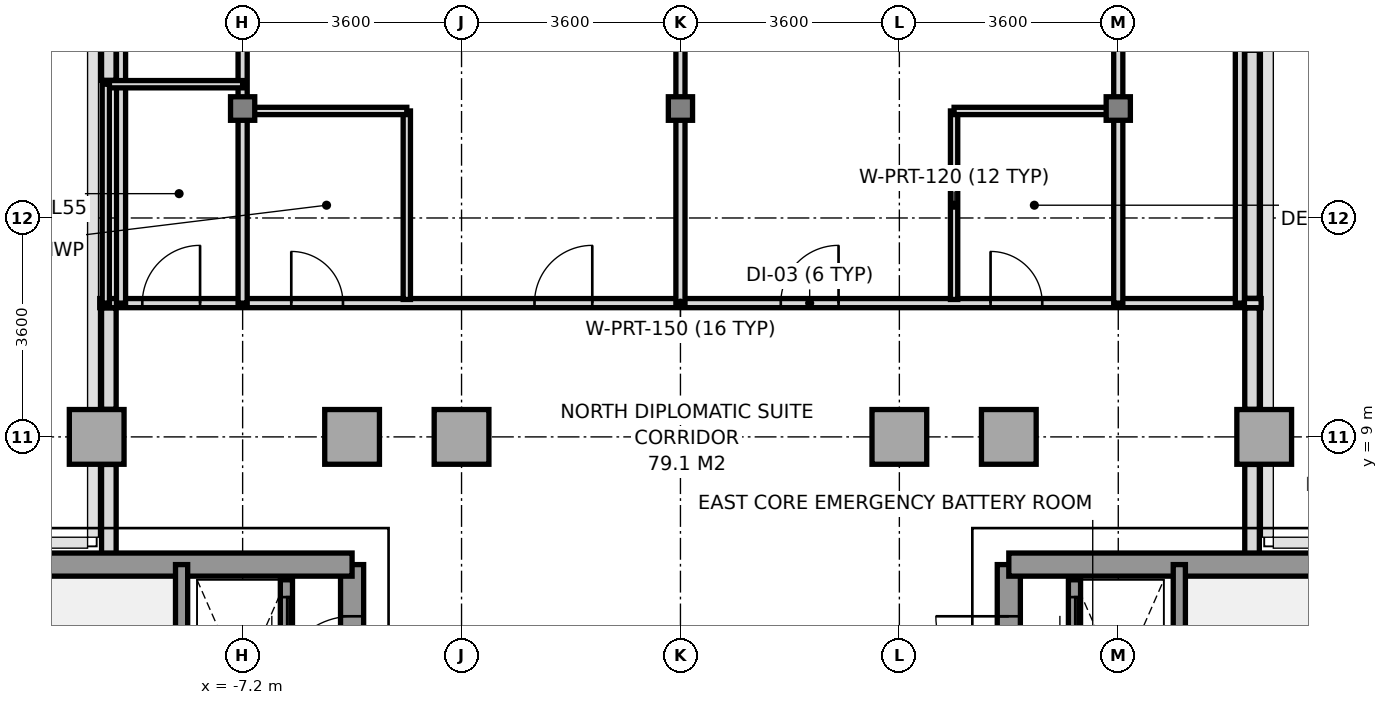
"""IFC4 building model, lengths in metres.
Left out: names, types, materials, properties, quantities, classifications, styles, units other than length and angle.
Written with IfcOpenShell. Run it as: python <this file> out.ifc"""

import sys

from ifc_helpers import new_model, si_unit, direction, frame, frame_2d, origin, origin_2d, place, context, subcontext, project, spatial, rectangle, i_section, extrude, source, transform, mapped, element, fill, save


model = new_model("IFC4")
c1 = context("Model", 3, precision=1e-05, world=origin(), true_north=direction((0.0, 1.0)))
c2 = subcontext(c1, "Body", "Model", "MODEL_VIEW")
j1 = project(units=[si_unit("LENGTHUNIT", "METRE"), si_unit("PLANEANGLEUNIT", "RADIAN")], contexts=[c1])
p1 = place(None, origin())
s1 = spatial("IfcSite", under=j1, at=p1, CompositionType="ELEMENT")
p2 = place(p1, origin())
s2 = spatial("IfcBuilding", under=s1, at=p2, CompositionType="ELEMENT")
p3 = place(p2, frame((0.0, 0.0, 201.2)))
s3 = spatial("IfcBuildingStorey", under=s2, at=p3, CompositionType="ELEMENT", Elevation=201.2)
m1 = source(origin(), c2, "Body", "SweptSolid", [
    extrude(rectangle(XDim=0.9, YDim=0.9, at=origin_2d()), origin(), (0.0, 0.0, 1.0), 3.2),
])
p4 = place(p3, frame((-9.6, 9.0, 0.0), z_axis=(0.0, 0.0, 1.0), x_axis=(1.0, 0.0, 0.0)))
e1 = element("IfcColumn", 1, at=p4, inside=s3, PredefinedType="COLUMN", context=c2, shape_type="MappedRepresentation", body=[
    mapped(m1, transform((0.0, 0.0, 0.0), x_axis=(1.0, 0.0, 0.0), y_axis=(0.0, 1.0, 0.0), z_axis=(0.0, 0.0, 1.0), scale=1.0)),
])
m2 = source(origin(), c2, "Body", "SweptSolid", [
    extrude(i_section(OverallWidth=0.398, OverallDepth=0.387, WebThickness=0.018, FlangeThickness=0.028, at=origin_2d()), origin(), (0.0, 0.0, 1.0), 3.2),
])
p5 = place(p3, frame((-7.2, 14.4, 0.0), z_axis=(0.0, 0.0, 1.0), x_axis=(1.0, 0.0, 0.0)))
e2 = element("IfcColumn", 2, at=p5, inside=s3, PredefinedType="COLUMN", context=c2, shape_type="MappedRepresentation", body=[
    mapped(m2, transform((0.0, 0.0, 0.0), x_axis=(1.0, 0.0, 0.0), y_axis=(0.0, 1.0, 0.0), z_axis=(0.0, 0.0, 1.0), scale=1.0)),
])
for number, where, z_axis, x_axis in (
    (3, (-5.4, 9.0, 0.0), (0.0, 0.0, 1.0), (1.0, 0.0, 0.0)),
    (4, (-3.6, 9.0, 0.0), (0.0, 0.0, 1.0), (1.0, 0.0, 0.0)),
):
    element("IfcColumn", number, at=place(p3, frame(where, z_axis=z_axis, x_axis=x_axis)), inside=s3, PredefinedType="COLUMN", context=c2, shape_type="MappedRepresentation", body=[
        mapped(m1, transform((0.0, 0.0, 0.0), x_axis=(1.0, 0.0, 0.0), y_axis=(0.0, 1.0, 0.0), z_axis=(0.0, 0.0, 1.0), scale=1.0)),
    ])
p6 = place(p3, frame((0.0, 14.4, 0.0), z_axis=(0.0, 0.0, 1.0), x_axis=(1.0, 0.0, 0.0)))
e5 = element("IfcColumn", 5, at=p6, inside=s3, PredefinedType="COLUMN", context=c2, shape_type="MappedRepresentation", body=[
    mapped(m2, transform((0.0, 0.0, 0.0), x_axis=(1.0, 0.0, 0.0), y_axis=(0.0, 1.0, 0.0), z_axis=(0.0, 0.0, 1.0), scale=1.0)),
])
for number, where, z_axis, x_axis in (
    (6, (3.6, 9.0, 0.0), (0.0, 0.0, 1.0), (1.0, 0.0, 0.0)),
    (7, (5.4, 9.0, 0.0), (0.0, 0.0, 1.0), (1.0, 0.0, 0.0)),
):
    element("IfcColumn", number, at=place(p3, frame(where, z_axis=z_axis, x_axis=x_axis)), inside=s3, PredefinedType="COLUMN", context=c2, shape_type="MappedRepresentation", body=[
        mapped(m1, transform((0.0, 0.0, 0.0), x_axis=(1.0, 0.0, 0.0), y_axis=(0.0, 1.0, 0.0), z_axis=(0.0, 0.0, 1.0), scale=1.0)),
    ])
p7 = place(p3, frame((7.2, 14.4, 0.0), z_axis=(0.0, 0.0, 1.0), x_axis=(1.0, 0.0, 0.0)))
e8 = element("IfcColumn", 8, at=p7, inside=s3, PredefinedType="COLUMN", context=c2, shape_type="MappedRepresentation", body=[
    mapped(m2, transform((0.0, 0.0, 0.0), x_axis=(1.0, 0.0, 0.0), y_axis=(0.0, 1.0, 0.0), z_axis=(0.0, 0.0, 1.0), scale=1.0)),
])
p8 = place(p3, frame((9.6, 9.0, 0.0), z_axis=(0.0, 0.0, 1.0), x_axis=(1.0, 0.0, 0.0)))
e9 = element("IfcColumn", 9, at=p8, inside=s3, PredefinedType="COLUMN", context=c2, shape_type="MappedRepresentation", body=[
    mapped(m1, transform((0.0, 0.0, 0.0), x_axis=(1.0, 0.0, 0.0), y_axis=(0.0, 1.0, 0.0), z_axis=(0.0, 0.0, 1.0), scale=1.0)),
])
p9 = place(p3, frame((-9.4, 6.953, 0.0), z_axis=(0.0, 0.0, 1.0), x_axis=(0.0, 1.0, 0.0)))
e10 = element("IfcWall", 10, at=p9, inside=s3, PredefinedType="PARAPET", context=c2, shape_type="SweptSolid", body=[
    extrude(rectangle(XDim=1.594, YDim=0.24, at=frame_2d((0.797, 0.0))), origin(), (0.0, 0.0, 1.0), 1.15),
])
p10 = place(p3, frame((-9.4, 9.453, 0.0), z_axis=(0.0, 0.0, 1.0), x_axis=(0.0, 1.0, 0.0)))
e11 = element("IfcWall", 11, at=p10, inside=s3, PredefinedType="PARAPET", context=c2, shape_type="SweptSolid", body=[
    extrude(rectangle(XDim=1.669, YDim=0.24, at=frame_2d((0.834, 0.0))), origin(), (0.0, 0.0, 1.0), 1.15),
])
p11 = place(p3, frame((-9.4, 14.863, 0.0), z_axis=(0.0, 0.0, 1.0), x_axis=(0.0, 1.0, 0.0)))
e12 = element("IfcWall", 12, at=p11, inside=s3, PredefinedType="PARAPET", context=c2, shape_type="SweptSolid", body=[
    extrude(rectangle(XDim=0.74, YDim=0.24, at=frame_2d((0.37, 0.0))), origin(), (0.0, 0.0, 1.0), 1.15),
])
p12 = place(p3, frame((9.4, 15.358, 0.0), z_axis=(0.0, 0.0, 1.0), x_axis=(0.0, -1.0, 0.0)))
e13 = element("IfcWall", 13, at=p12, inside=s3, PredefinedType="PARAPET", context=c2, shape_type="SweptSolid", body=[
    extrude(rectangle(XDim=4.08, YDim=0.24, at=frame_2d((2.04, 0.0))), origin(), (0.0, 0.0, 1.0), 1.15),
])
p13 = place(p3, frame((9.4, 11.122, 0.0), z_axis=(0.0, 0.0, 1.0), x_axis=(0.0, -1.0, 0.0)))
e14 = element("IfcWall", 14, at=p13, inside=s3, PredefinedType="PARAPET", context=c2, shape_type="SweptSolid", body=[
    extrude(rectangle(XDim=1.669, YDim=0.24, at=frame_2d((0.834, 0.0))), origin(), (0.0, 0.0, 1.0), 1.15),
])
p14 = place(p3, frame((9.4, 8.547, 0.0), z_axis=(0.0, 0.0, 1.0), x_axis=(0.0, -1.0, 0.0)))
e15 = element("IfcWall", 15, at=p14, inside=s3, PredefinedType="PARAPET", context=c2, shape_type="SweptSolid", body=[
    extrude(rectangle(XDim=1.594, YDim=0.24, at=frame_2d((0.797, 0.0))), origin(), (0.0, 0.0, 1.0), 1.15),
])
p15 = place(p3, frame((-5.4, -5.6, 0.0), z_axis=(0.0, 0.0, 1.0), x_axis=(0.0, 1.0, 0.0)))
e16 = element("IfcWall", 16, at=p15, inside=s3, PredefinedType="SHEAR", context=c2, shape_type="SweptSolid", body=[
    extrude(rectangle(XDim=12.5, YDim=0.38, at=frame_2d((6.25, 0.0))), origin(), (0.0, 0.0, 1.0), 3.2),
])
p16 = place(p15, frame((4.55, 0.0, 0.0)))
e17 = element("IfcOpeningElement", 17, at=p16, cuts=e16, PredefinedType="OPENING", context=c2, shape_type="SweptSolid", body=[
    extrude(rectangle(XDim=1.2, YDim=2.2, at=frame_2d((0.6, 1.1))), frame((0.0, 0.2, 0.0), z_axis=(0.0, -1.0, 0.0), x_axis=(1.0, 0.0, 0.0)), (0.0, 0.0, 1.0), 0.4),
])
p17 = place(p15, frame((10.45, 0.0, 0.0)))
e18 = element("IfcOpeningElement", 18, at=p17, cuts=e16, PredefinedType="OPENING", context=c2, shape_type="SweptSolid", body=[
    extrude(rectangle(XDim=1.2, YDim=2.2, at=frame_2d((0.6, 1.1))), frame((0.0, 0.2, 0.0), z_axis=(0.0, -1.0, 0.0), x_axis=(1.0, 0.0, 0.0)), (0.0, 0.0, 1.0), 0.4),
])
p18 = place(p3, frame((-11.356, 6.9, 0.0), z_axis=(0.0, 0.0, 1.0), x_axis=(1.0, 0.0, 0.0)))
e19 = element("IfcWall", 19, at=p18, inside=s3, PredefinedType="SHEAR", context=c2, shape_type="SweptSolid", body=[
    extrude(rectangle(XDim=5.956, YDim=0.38, at=frame_2d((2.978, 0.0))), origin(), (0.0, 0.0, 1.0), 3.2),
])
p19 = place(p3, frame((-8.204, -0.016, 0.0), z_axis=(0.0, 0.0, 1.0), x_axis=(0.0, 1.0, 0.0)))
e20 = element("IfcWall", 20, at=p19, inside=s3, PredefinedType="SOLIDWALL", context=c2, shape_type="SweptSolid", body=[
    extrude(rectangle(XDim=6.916, YDim=0.2, at=frame_2d((3.458, 0.0))), origin(), (0.0, 0.0, 1.0), 3.2),
])
p20 = place(p19, frame((0.2, 0.0, 0.0)))
e21 = element("IfcOpeningElement", 21, at=p20, cuts=e20, PredefinedType="OPENING", context=c2, shape_type="SweptSolid", body=[
    extrude(rectangle(XDim=1.2, YDim=2.2, at=frame_2d((0.6, 1.1))), frame((0.0, 0.11, 0.0), z_axis=(0.0, -1.0, 0.0), x_axis=(1.0, 0.0, 0.0)), (0.0, 0.0, 1.0), 0.22),
])
p21 = place(p3, frame((5.4, -5.6, 0.0), z_axis=(0.0, 0.0, 1.0), x_axis=(0.0, 1.0, 0.0)))
e22 = element("IfcWall", 22, at=p21, inside=s3, PredefinedType="SHEAR", context=c2, shape_type="SweptSolid", body=[
    extrude(rectangle(XDim=12.5, YDim=0.38, at=frame_2d((6.25, 0.0))), origin(), (0.0, 0.0, 1.0), 3.2),
])
p22 = place(p21, frame((4.55, 0.0, 0.0)))
e23 = element("IfcOpeningElement", 23, at=p22, cuts=e22, PredefinedType="OPENING", context=c2, shape_type="SweptSolid", body=[
    extrude(rectangle(XDim=1.2, YDim=2.2, at=frame_2d((0.6, 1.1))), frame((0.0, 0.2, 0.0), z_axis=(0.0, -1.0, 0.0), x_axis=(1.0, 0.0, 0.0)), (0.0, 0.0, 1.0), 0.4),
])
p23 = place(p21, frame((10.45, 0.0, 0.0)))
e24 = element("IfcOpeningElement", 24, at=p23, cuts=e22, PredefinedType="OPENING", context=c2, shape_type="SweptSolid", body=[
    extrude(rectangle(XDim=1.2, YDim=2.2, at=frame_2d((0.6, 1.1))), frame((0.0, 0.2, 0.0), z_axis=(0.0, -1.0, 0.0), x_axis=(1.0, 0.0, 0.0)), (0.0, 0.0, 1.0), 0.4),
])
p24 = place(p21, frame((7.88, 0.0, 0.0)))
e25 = element("IfcOpeningElement", 25, at=p24, cuts=e22, PredefinedType="OPENING", context=c2, shape_type="SweptSolid", body=[
    extrude(rectangle(XDim=0.8, YDim=2.1, at=frame_2d((0.4, 1.05))), frame((0.0, 0.2, 0.0), z_axis=(0.0, -1.0, 0.0), x_axis=(1.0, 0.0, 0.0)), (0.0, 0.0, 1.0), 0.4),
])
p25 = place(p3, frame((5.4, 6.9, 0.0), z_axis=(0.0, 0.0, 1.0), x_axis=(1.0, 0.0, 0.0)))
e26 = element("IfcWall", 26, at=p25, inside=s3, PredefinedType="SHEAR", context=c2, shape_type="SweptSolid", body=[
    extrude(rectangle(XDim=5.956, YDim=0.38, at=frame_2d((2.978, 0.0))), origin(), (0.0, 0.0, 1.0), 3.2),
])
p26 = place(p3, frame((8.204, -0.016, 0.0), z_axis=(0.0, 0.0, 1.0), x_axis=(0.0, 1.0, 0.0)))
e27 = element("IfcWall", 27, at=p26, inside=s3, PredefinedType="SOLIDWALL", context=c2, shape_type="SweptSolid", body=[
    extrude(rectangle(XDim=6.916, YDim=0.2, at=frame_2d((3.458, 0.0))), origin(), (0.0, 0.0, 1.0), 3.2),
])
p27 = place(p26, frame((0.2, 0.0, 0.0)))
e28 = element("IfcOpeningElement", 28, at=p27, cuts=e27, PredefinedType="OPENING", context=c2, shape_type="SweptSolid", body=[
    extrude(rectangle(XDim=1.2, YDim=2.2, at=frame_2d((0.6, 1.1))), frame((0.0, 0.11, 0.0), z_axis=(0.0, -1.0, 0.0), x_axis=(1.0, 0.0, 0.0)), (0.0, 0.0, 1.0), 0.22),
])
p28 = place(p3, frame((-6.48, 4.98, 0.0), z_axis=(0.0, 0.0, 1.0), x_axis=(0.0, 1.0, 0.0)))
e29 = element("IfcWall", 29, at=p28, inside=s3, PredefinedType="SOLIDWALL", context=c2, shape_type="SweptSolid", body=[
    extrude(rectangle(XDim=1.67, YDim=0.2, at=frame_2d((0.835, 0.0))), origin(), (0.0, 0.0, 1.0), 3.2),
])
p29 = place(p28, frame((0.285, 0.0, 0.0)))
e30 = element("IfcOpeningElement", 30, at=p29, cuts=e29, PredefinedType="OPENING", context=c2, shape_type="SweptSolid", body=[
    extrude(rectangle(XDim=1.1, YDim=2.2, at=frame_2d((0.55, 1.1))), frame((0.0, 0.11, 0.0), z_axis=(0.0, -1.0, 0.0), x_axis=(1.0, 0.0, 0.0)), (0.0, 0.0, 1.0), 0.22),
])
p30 = place(p3, frame((6.48, 4.98, 0.0), z_axis=(0.0, 0.0, 1.0), x_axis=(0.0, 1.0, 0.0)))
e31 = element("IfcWall", 31, at=p30, inside=s3, PredefinedType="SOLIDWALL", context=c2, shape_type="SweptSolid", body=[
    extrude(rectangle(XDim=1.67, YDim=0.2, at=frame_2d((0.835, 0.0))), origin(), (0.0, 0.0, 1.0), 3.2),
])
p31 = place(p30, frame((0.285, 0.0, 0.0)))
e32 = element("IfcOpeningElement", 32, at=p31, cuts=e31, PredefinedType="OPENING", context=c2, shape_type="SweptSolid", body=[
    extrude(rectangle(XDim=1.1, YDim=2.2, at=frame_2d((0.55, 1.1))), frame((0.0, 0.11, 0.0), z_axis=(0.0, -1.0, 0.0), x_axis=(1.0, 0.0, 0.0)), (0.0, 0.0, 1.0), 0.22),
])
p32 = place(p3, frame((-9.55, 11.2, 0.0), z_axis=(0.0, 0.0, 1.0), x_axis=(1.0, 0.0, 0.0)))
e33 = element("IfcWall", 33, at=p32, inside=s3, PredefinedType="PARTITIONING", context=c2, shape_type="SweptSolid", body=[
    extrude(rectangle(XDim=19.1, YDim=0.15, at=frame_2d((9.55, 0.0))), origin(), (0.0, 0.0, 1.0), 3.2),
])
p33 = place(p32, frame((0.7, 0.0, 0.0)))
e34 = element("IfcOpeningElement", 34, at=p33, cuts=e33, PredefinedType="OPENING", context=c2, shape_type="SweptSolid", body=[
    extrude(rectangle(XDim=0.95, YDim=2.15, at=frame_2d((0.475, 1.075))), frame((0.0, 0.085, 0.0), z_axis=(0.0, -1.0, 0.0), x_axis=(1.0, 0.0, 0.0)), (0.0, 0.0, 1.0), 0.17),
])
p34 = place(p32, frame((3.15, 0.0, 0.0)))
e35 = element("IfcOpeningElement", 35, at=p34, cuts=e33, PredefinedType="OPENING", context=c2, shape_type="SweptSolid", body=[
    extrude(rectangle(XDim=0.85, YDim=2.1, at=frame_2d((0.425, 1.05))), frame((0.0, 0.085, 0.0), z_axis=(0.0, -1.0, 0.0), x_axis=(1.0, 0.0, 0.0)), (0.0, 0.0, 1.0), 0.17),
])
p35 = place(p32, frame((7.15, 0.0, 0.0)))
e36 = element("IfcOpeningElement", 36, at=p35, cuts=e33, PredefinedType="OPENING", context=c2, shape_type="SweptSolid", body=[
    extrude(rectangle(XDim=0.95, YDim=2.15, at=frame_2d((0.475, 1.075))), frame((0.0, 0.085, 0.0), z_axis=(0.0, -1.0, 0.0), x_axis=(1.0, 0.0, 0.0)), (0.0, 0.0, 1.0), 0.17),
])
p36 = place(p32, frame((14.65, 0.0, 0.0)))
e37 = element("IfcOpeningElement", 37, at=p36, cuts=e33, PredefinedType="OPENING", context=c2, shape_type="SweptSolid", body=[
    extrude(rectangle(XDim=0.85, YDim=2.1, at=frame_2d((0.425, 1.05))), frame((0.0, 0.085, 0.0), z_axis=(0.0, -1.0, 0.0), x_axis=(1.0, 0.0, 0.0)), (0.0, 0.0, 1.0), 0.17),
])
p37 = place(p32, frame((11.2, 0.0, 0.0)))
e38 = element("IfcOpeningElement", 38, at=p37, cuts=e33, PredefinedType="OPENING", context=c2, shape_type="SweptSolid", body=[
    extrude(rectangle(XDim=0.95, YDim=2.15, at=frame_2d((0.475, 1.075))), frame((0.0, 0.085, 0.0), z_axis=(0.0, -1.0, 0.0), x_axis=(1.0, 0.0, 0.0)), (0.0, 0.0, 1.0), 0.17),
])
for number, where, z_axis, x_axis in (
    (39, (-9.2, 11.2, 0.0), (0.0, 0.0, 1.0), (0.0, 1.0, 0.0)),
    (40, (9.2, 11.2, 0.0), (0.0, 0.0, 1.0), (0.0, 1.0, 0.0)),
):
    element("IfcWall", number, at=place(p3, frame(where, z_axis=z_axis, x_axis=x_axis)), inside=s3, PredefinedType="PARTITIONING", context=c2, shape_type="SweptSolid", body=[
        extrude(rectangle(XDim=4.48, YDim=0.15, at=frame_2d((2.24, 0.0))), origin(), (0.0, 0.0, 1.0), 3.2),
    ])
p38 = place(p3, frame((-7.2, 11.2, 0.0), z_axis=(0.0, 0.0, 1.0), x_axis=(0.0, 1.0, 0.0)))
e41 = element("IfcWall", 41, at=p38, inside=s3, PredefinedType="PARTITIONING", context=c2, shape_type="SweptSolid", body=[
    extrude(rectangle(XDim=12.2, YDim=0.15, at=frame_2d((6.1, 0.0))), origin(), (0.0, 0.0, 1.0), 2.75),
])
p39 = place(p3, frame((0.0, 11.2, 0.0), z_axis=(0.0, 0.0, 1.0), x_axis=(0.0, 1.0, 0.0)))
e42 = element("IfcWall", 42, at=p39, inside=s3, PredefinedType="PARTITIONING", context=c2, shape_type="SweptSolid", body=[
    extrude(rectangle(XDim=13.45, YDim=0.15, at=frame_2d((6.725, 0.0))), origin(), (0.0, 0.0, 1.0), 2.75),
])
p40 = place(p3, frame((7.2, 11.2, 0.0), z_axis=(0.0, 0.0, 1.0), x_axis=(0.0, 1.0, 0.0)))
e43 = element("IfcWall", 43, at=p40, inside=s3, PredefinedType="PARTITIONING", context=c2, shape_type="SweptSolid", body=[
    extrude(rectangle(XDim=12.2, YDim=0.15, at=frame_2d((6.1, 0.0))), origin(), (0.0, 0.0, 1.0), 2.75),
])
p41 = place(p3, frame((-9.45, 14.8, 0.0), z_axis=(0.0, 0.0, 1.0), x_axis=(1.0, 0.0, 0.0)))
e44 = element("IfcWall", 44, at=p41, inside=s3, PredefinedType="PARTITIONING", context=c2, shape_type="SweptSolid", body=[
    extrude(rectangle(XDim=2.25, YDim=0.12, at=frame_2d((1.125, 0.0))), origin(), (0.0, 0.0, 1.0), 3.2),
])
p42 = place(p3, frame((-9.45, 11.2, 0.0), z_axis=(0.0, 0.0, 1.0), x_axis=(0.0, 1.0, 0.0)))
e45 = element("IfcWall", 45, at=p42, inside=s3, PredefinedType="PARTITIONING", context=c2, shape_type="SweptSolid", body=[
    extrude(rectangle(XDim=3.6, YDim=0.12, at=frame_2d((1.8, 0.0))), origin(), (0.0, 0.0, 1.0), 3.2),
])
p43 = place(p3, frame((-4.5, 11.26, 0.0), z_axis=(0.0, 0.0, 1.0), x_axis=(0.0, 1.0, 0.0)))
e46 = element("IfcWall", 46, at=p43, inside=s3, PredefinedType="PARTITIONING", context=c2, shape_type="SweptSolid", body=[
    extrude(rectangle(XDim=3.1, YDim=0.12, at=frame_2d((1.55, 0.0))), origin(), (0.0, 0.0, 1.0), 2.75),
])
p44 = place(p3, frame((-7.14, 14.36, 0.0), z_axis=(0.0, 0.0, 1.0), x_axis=(1.0, 0.0, 0.0)))
e47 = element("IfcWall", 47, at=p44, inside=s3, PredefinedType="PARTITIONING", context=c2, shape_type="SweptSolid", body=[
    extrude(rectangle(XDim=2.64, YDim=0.12, at=frame_2d((1.32, 0.0))), origin(), (0.0, 0.0, 1.0), 2.75),
])
p45 = place(p3, frame((4.5, 11.26, 0.0), z_axis=(0.0, 0.0, 1.0), x_axis=(0.0, 1.0, 0.0)))
e48 = element("IfcWall", 48, at=p45, inside=s3, PredefinedType="PARTITIONING", context=c2, shape_type="SweptSolid", body=[
    extrude(rectangle(XDim=3.1, YDim=0.12, at=frame_2d((1.55, 0.0))), origin(), (0.0, 0.0, 1.0), 2.75),
])
p46 = place(p3, frame((4.5, 14.36, 0.0), z_axis=(0.0, 0.0, 1.0), x_axis=(1.0, 0.0, 0.0)))
e49 = element("IfcWall", 49, at=p46, inside=s3, PredefinedType="PARTITIONING", context=c2, shape_type="SweptSolid", body=[
    extrude(rectangle(XDim=2.64, YDim=0.12, at=frame_2d((1.32, 0.0))), origin(), (0.0, 0.0, 1.0), 2.75),
])
m3 = source(origin(), c2, "Body", "SweptSolid", [
    extrude(rectangle(XDim=1.2, YDim=2.2, at=frame_2d((0.6, 1.1))), frame((0.0, 0.025, 0.0), z_axis=(0.0, -1.0, 0.0), x_axis=(1.0, 0.0, 0.0)), (0.0, 0.0, 1.0), 0.05),
])
p47 = place(p17, origin())
e50 = element("IfcDoor", 50, at=p47, inside=s3, OperationType="SINGLE_SWING_LEFT", PredefinedType="DOOR", context=c2, shape_type="MappedRepresentation", body=[
    mapped(m3, transform((0.0, 0.0, 0.0), x_axis=(1.0, 0.0, 0.0), y_axis=(0.0, 1.0, 0.0), z_axis=(0.0, 0.0, 1.0), scale=1.0)),
])
fill(e18, e50)
p48 = place(p23, origin())
e51 = element("IfcDoor", 51, at=p48, inside=s3, OperationType="SINGLE_SWING_RIGHT", PredefinedType="DOOR", context=c2, shape_type="MappedRepresentation", body=[
    mapped(m3, transform((0.0, 0.0, 0.0), x_axis=(1.0, 0.0, 0.0), y_axis=(0.0, 1.0, 0.0), z_axis=(0.0, 0.0, 1.0), scale=1.0)),
])
fill(e24, e51)
m4 = source(origin(), c2, "Body", "SweptSolid", [
    extrude(rectangle(XDim=1.1, YDim=2.2, at=frame_2d((0.55, 1.1))), frame((0.0, 0.025, 0.0), z_axis=(0.0, -1.0, 0.0), x_axis=(1.0, 0.0, 0.0)), (0.0, 0.0, 1.0), 0.05),
])
p49 = place(p29, origin())
e52 = element("IfcDoor", 52, at=p49, inside=s3, OperationType="SLIDING_TO_LEFT", PredefinedType="DOOR", context=c2, shape_type="MappedRepresentation", body=[
    mapped(m4, transform((0.0, 0.0, 0.0), x_axis=(1.0, 0.0, 0.0), y_axis=(0.0, 1.0, 0.0), z_axis=(0.0, 0.0, 1.0), scale=1.0)),
])
fill(e30, e52)
p50 = place(p31, origin())
e53 = element("IfcDoor", 53, at=p50, inside=s3, OperationType="SLIDING_TO_LEFT", PredefinedType="DOOR", context=c2, shape_type="MappedRepresentation", body=[
    mapped(m4, transform((0.0, 0.0, 0.0), x_axis=(1.0, 0.0, 0.0), y_axis=(0.0, 1.0, 0.0), z_axis=(0.0, 0.0, 1.0), scale=1.0)),
])
fill(e32, e53)
m5 = source(origin(), c2, "Body", "SweptSolid", [
    extrude(rectangle(XDim=0.95, YDim=2.15, at=frame_2d((0.475, 1.075))), frame((0.0, 0.025, 0.0), z_axis=(0.0, -1.0, 0.0), x_axis=(1.0, 0.0, 0.0)), (0.0, 0.0, 1.0), 0.05),
])
p51 = place(p33, origin())
e54 = element("IfcDoor", 54, at=p51, inside=s3, OperationType="SINGLE_SWING_RIGHT", PredefinedType="DOOR", context=c2, shape_type="MappedRepresentation", body=[
    mapped(m5, transform((0.0, 0.0, 0.0), x_axis=(1.0, 0.0, 0.0), y_axis=(0.0, 1.0, 0.0), z_axis=(0.0, 0.0, 1.0), scale=1.0)),
])
fill(e34, e54)
m6 = source(origin(), c2, "Body", "SweptSolid", [
    extrude(rectangle(XDim=0.85, YDim=2.1, at=frame_2d((0.425, 1.05))), frame((0.0, 0.025, 0.0), z_axis=(0.0, -1.0, 0.0), x_axis=(1.0, 0.0, 0.0)), (0.0, 0.0, 1.0), 0.05),
])
p52 = place(p34, origin())
e55 = element("IfcDoor", 55, at=p52, inside=s3, OperationType="SINGLE_SWING_LEFT", PredefinedType="DOOR", context=c2, shape_type="MappedRepresentation", body=[
    mapped(m6, transform((0.0, 0.0, 0.0), x_axis=(1.0, 0.0, 0.0), y_axis=(0.0, 1.0, 0.0), z_axis=(0.0, 0.0, 1.0), scale=1.0)),
])
fill(e35, e55)
p53 = place(p35, origin())
e56 = element("IfcDoor", 56, at=p53, inside=s3, OperationType="SINGLE_SWING_RIGHT", PredefinedType="DOOR", context=c2, shape_type="MappedRepresentation", body=[
    mapped(m5, transform((0.0, 0.0, 0.0), x_axis=(1.0, 0.0, 0.0), y_axis=(0.0, 1.0, 0.0), z_axis=(0.0, 0.0, 1.0), scale=1.0)),
])
fill(e36, e56)
p54 = place(p36, origin())
e57 = element("IfcDoor", 57, at=p54, inside=s3, OperationType="SINGLE_SWING_LEFT", PredefinedType="DOOR", context=c2, shape_type="MappedRepresentation", body=[
    mapped(m6, transform((0.0, 0.0, 0.0), x_axis=(1.0, 0.0, 0.0), y_axis=(0.0, 1.0, 0.0), z_axis=(0.0, 0.0, 1.0), scale=1.0)),
])
fill(e37, e57)
p55 = place(p37, origin())
e58 = element("IfcDoor", 58, at=p55, inside=s3, OperationType="SINGLE_SWING_RIGHT", PredefinedType="DOOR", context=c2, shape_type="MappedRepresentation", body=[
    mapped(m5, transform((0.0, 0.0, 0.0), x_axis=(1.0, 0.0, 0.0), y_axis=(0.0, 1.0, 0.0), z_axis=(0.0, 0.0, 1.0), scale=1.0)),
])
fill(e38, e58)
save(model, sys.argv[1])
